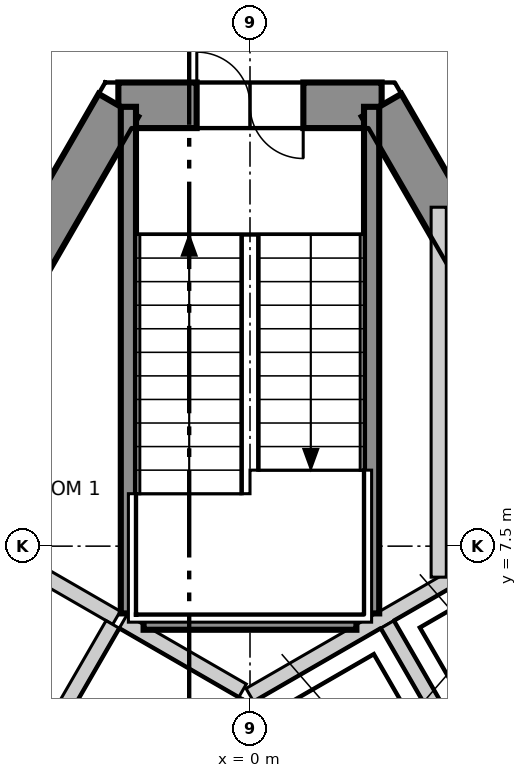
"""IFC4 building model, lengths in metres.
Left out: names, types, materials, properties, quantities, classifications, styles, units other than length and angle.
Written with IfcOpenShell. Run it as: python <this file> out.ifc"""

import sys

from ifc_helpers import new_model, si_unit, direction, frame, frame_2d, origin, place, context, subcontext, project, spatial, polyline, rectangle, outline, extrude, element, fill, save


model = new_model("IFC4")
c1 = context("Model", 3, precision=1e-05, world=origin(), true_north=direction((0.0, 1.0)))
c2 = subcontext(c1, "Body", "Model", "MODEL_VIEW")
j1 = project(units=[si_unit("LENGTHUNIT", "METRE"), si_unit("PLANEANGLEUNIT", "RADIAN")], contexts=[c1])
p1 = place(None, origin())
s1 = spatial("IfcSite", under=j1, at=p1, CompositionType="ELEMENT")
p2 = place(p1, origin())
s2 = spatial("IfcBuilding", under=s1, at=p2, CompositionType="ELEMENT")
p3 = place(p2, frame((0.0, 0.0, 268.3)))
s3 = spatial("IfcBuildingStorey", under=s2, at=p3, CompositionType="ELEMENT", Elevation=268.3)
p4 = place(p3, frame((1.732, 13.3, -0.3), z_axis=(0.0, 0.0, 1.0), x_axis=(-1.0, 0.0, 0.0)))
e1 = element("IfcWall", 1, at=p4, inside=s3, PredefinedType="SHEAR", context=c2, shape_type="SweptSolid", body=[
    extrude(outline(polyline([(-0.173, -0.3), (1.732, -0.3), (3.637, -0.3), (3.291, 0.3), (1.732, 0.3), (0.173, 0.3), (-0.173, -0.3)])), origin(), (0.0, 0.0, 1.0), 3.6),
])
p5 = place(p4, frame((1.032, 0.0, 0.3)))
e2 = element("IfcOpeningElement", 2, at=p5, cuts=e1, PredefinedType="OPENING", context=c2, shape_type="SweptSolid", body=[
    extrude(rectangle(XDim=1.4, YDim=2.1, at=frame_2d((0.7, 1.05))), frame((0.0, 0.31, 0.0), z_axis=(0.0, -1.0, 0.0), x_axis=(1.0, 0.0, 0.0)), (0.0, 0.0, 1.0), 0.62),
])
p6 = place(p3, frame((-1.732, 13.3, -0.3), z_axis=(0.0, 0.0, 1.0), x_axis=(-0.500000539815, -0.866025092122, 0.0)))
e3 = element("IfcWall", 3, at=p6, inside=s3, PredefinedType="SHEAR", context=c2, shape_type="SweptSolid", body=[
    extrude(outline(polyline([(-0.173, -0.3), (1.795, -0.3), (3.763, -0.3), (5.732, -0.3), (7.7, -0.3), (9.668, -0.301), (11.637, -0.301), (13.605, -0.301), (15.573, -0.301), (17.542, -0.301), (19.51, -0.301), (21.478, -0.301), (21.131, 0.3), (19.226, 0.3), (17.321, 0.3), (15.415, 0.3), (13.51, 0.3), (11.605, 0.3), (9.699, 0.3), (7.794, 0.3), (5.889, 0.3), (3.984, 0.3), (2.078, 0.3), (0.173, 0.3), (-0.173, -0.3)])), origin(), (0.0, 0.0, 1.0), 3.6),
])
p7 = place(p6, frame((10.102, 0.0, 0.3)))
e4 = element("IfcOpeningElement", 4, at=p7, cuts=e3, PredefinedType="OPENING", context=c2, shape_type="SweptSolid", body=[
    extrude(rectangle(XDim=1.1, YDim=2.1, at=frame_2d((0.55, 1.05))), frame((0.0, 0.31, 0.0), z_axis=(0.0, -1.0, 0.0), x_axis=(1.0, 0.0, 0.0)), (0.0, 0.0, 1.0), 0.621),
])
p8 = place(p6, frame((16.378, 0.0, 0.3)))
e5 = element("IfcOpeningElement", 5, at=p8, cuts=e3, PredefinedType="OPENING", context=c2, shape_type="SweptSolid", body=[
    extrude(rectangle(XDim=0.9, YDim=2.1, at=frame_2d((0.45, 1.05))), frame((0.0, 0.31, 0.0), z_axis=(0.0, -1.0, 0.0), x_axis=(1.0, 0.0, 0.0)), (0.0, 0.0, 1.0), 0.621),
])
p9 = place(p6, frame((4.026, 0.0, 0.3)))
e6 = element("IfcOpeningElement", 6, at=p9, cuts=e3, PredefinedType="OPENING", context=c2, shape_type="SweptSolid", body=[
    extrude(rectangle(XDim=0.9, YDim=2.1, at=frame_2d((0.45, 1.05))), frame((0.0, 0.31, 0.0), z_axis=(0.0, -1.0, 0.0), x_axis=(1.0, 0.0, 0.0)), (0.0, 0.0, 1.0), 0.621),
])
p10 = place(p3, frame((12.384, -5.15, -0.3), z_axis=(0.0, 0.0, 1.0), x_axis=(-0.500000539815, 0.866025092122, 0.0)))
e7 = element("IfcWall", 7, at=p10, inside=s3, PredefinedType="SHEAR", context=c2, shape_type="SweptSolid", body=[
    extrude(outline(polyline([(-0.173, -0.301), (1.795, -0.301), (3.763, -0.301), (5.731, -0.301), (7.7, -0.301), (9.668, -0.301), (11.636, -0.301), (13.604, -0.3), (15.573, -0.3), (17.541, -0.3), (19.509, -0.3), (21.477, -0.3), (21.131, 0.3), (19.226, 0.3), (17.321, 0.3), (15.415, 0.3), (13.51, 0.3), (11.605, 0.3), (9.699, 0.3), (7.794, 0.3), (5.889, 0.3), (3.984, 0.3), (2.078, 0.3), (0.173, 0.3), (-0.173, -0.301)])), origin(), (0.0, 0.0, 1.0), 3.6),
])
p11 = place(p10, frame((15.627, 0.0, 0.3)))
e8 = element("IfcOpeningElement", 8, at=p11, cuts=e7, PredefinedType="OPENING", context=c2, shape_type="SweptSolid", body=[
    extrude(rectangle(XDim=0.9, YDim=2.1, at=frame_2d((0.45, 1.05))), frame((0.0, 0.31, 0.0), z_axis=(0.0, -1.0, 0.0), x_axis=(1.0, 0.0, 0.0)), (0.0, 0.0, 1.0), 0.621),
])
p12 = place(p10, frame((4.026, 0.0, 0.3)))
e9 = element("IfcOpeningElement", 9, at=p12, cuts=e7, PredefinedType="OPENING", context=c2, shape_type="SweptSolid", body=[
    extrude(rectangle(XDim=0.9, YDim=2.1, at=frame_2d((0.45, 1.05))), frame((0.0, 0.31, 0.0), z_axis=(0.0, -1.0, 0.0), x_axis=(1.0, 0.0, 0.0)), (0.0, 0.0, 1.0), 0.621),
])
p13 = place(p3, frame((-2.577, 28.771, 0.0), z_axis=(0.0, 0.0, 1.0), x_axis=(-0.49999909388, -0.866025926932, 0.0)))
e10 = element("IfcWall", 10, at=p13, inside=s3, PredefinedType="ELEMENTEDWALL", context=c2, shape_type="SweptSolid", body=[
    extrude(rectangle(XDim=47.236, YDim=0.2, at=frame_2d((23.618, 0.0))), origin(), (0.0, 0.0, 1.0), 3.3),
])
p14 = place(p13, frame((2.243, 0.0, 0.9)))
e11 = element("IfcOpeningElement", 11, at=p14, cuts=e10, PredefinedType="OPENING", context=c2, shape_type="SweptSolid", body=[
    extrude(rectangle(XDim=3.7, YDim=2.2, at=frame_2d((1.85, 1.1))), frame((0.0, 0.11, 0.0), z_axis=(0.0, -1.0, 0.0), x_axis=(1.0, 0.0, 0.0)), (0.0, 0.0, 1.0), 0.22),
])
p15 = place(p13, frame((7.824, 0.0, 0.9)))
e12 = element("IfcOpeningElement", 12, at=p15, cuts=e10, PredefinedType="OPENING", context=c2, shape_type="SweptSolid", body=[
    extrude(rectangle(XDim=3.7, YDim=2.2, at=frame_2d((1.85, 1.1))), frame((0.0, 0.11, 0.0), z_axis=(0.0, -1.0, 0.0), x_axis=(1.0, 0.0, 0.0)), (0.0, 0.0, 1.0), 0.22),
])
p16 = place(p13, frame((13.406, 0.0, 0.9)))
e13 = element("IfcOpeningElement", 13, at=p16, cuts=e10, PredefinedType="OPENING", context=c2, shape_type="SweptSolid", body=[
    extrude(rectangle(XDim=3.7, YDim=2.2, at=frame_2d((1.85, 1.1))), frame((0.0, 0.11, 0.0), z_axis=(0.0, -1.0, 0.0), x_axis=(1.0, 0.0, 0.0)), (0.0, 0.0, 1.0), 0.22),
])
p17 = place(p13, frame((18.987, 0.0, 0.9)))
e14 = element("IfcOpeningElement", 14, at=p17, cuts=e10, PredefinedType="OPENING", context=c2, shape_type="SweptSolid", body=[
    extrude(rectangle(XDim=3.7, YDim=2.2, at=frame_2d((1.85, 1.1))), frame((0.0, 0.11, 0.0), z_axis=(0.0, -1.0, 0.0), x_axis=(1.0, 0.0, 0.0)), (0.0, 0.0, 1.0), 0.22),
])
p18 = place(p13, frame((24.569, 0.0, 0.9)))
e15 = element("IfcOpeningElement", 15, at=p18, cuts=e10, PredefinedType="OPENING", context=c2, shape_type="SweptSolid", body=[
    extrude(rectangle(XDim=3.7, YDim=2.2, at=frame_2d((1.85, 1.1))), frame((0.0, 0.11, 0.0), z_axis=(0.0, -1.0, 0.0), x_axis=(1.0, 0.0, 0.0)), (0.0, 0.0, 1.0), 0.22),
])
p19 = place(p13, frame((30.15, 0.0, 0.9)))
e16 = element("IfcOpeningElement", 16, at=p19, cuts=e10, PredefinedType="OPENING", context=c2, shape_type="SweptSolid", body=[
    extrude(rectangle(XDim=3.7, YDim=2.2, at=frame_2d((1.85, 1.1))), frame((0.0, 0.11, 0.0), z_axis=(0.0, -1.0, 0.0), x_axis=(1.0, 0.0, 0.0)), (0.0, 0.0, 1.0), 0.22),
])
p20 = place(p13, frame((35.731, 0.0, 0.9)))
e17 = element("IfcOpeningElement", 17, at=p20, cuts=e10, PredefinedType="OPENING", context=c2, shape_type="SweptSolid", body=[
    extrude(rectangle(XDim=3.7, YDim=2.2, at=frame_2d((1.85, 1.1))), frame((0.0, 0.11, 0.0), z_axis=(0.0, -1.0, 0.0), x_axis=(1.0, 0.0, 0.0)), (0.0, 0.0, 1.0), 0.22),
])
p21 = place(p13, frame((41.313, 0.0, 0.9)))
e18 = element("IfcOpeningElement", 18, at=p21, cuts=e10, PredefinedType="OPENING", context=c2, shape_type="SweptSolid", body=[
    extrude(rectangle(XDim=3.7, YDim=2.2, at=frame_2d((1.85, 1.1))), frame((0.0, 0.11, 0.0), z_axis=(0.0, -1.0, 0.0), x_axis=(1.0, 0.0, 0.0)), (0.0, 0.0, 1.0), 0.22),
])
p22 = place(p3, frame((26.205, -12.154, 0.0), z_axis=(0.0, 0.0, 1.0), x_axis=(-0.49999909388, 0.866025926932, 0.0)))
e19 = element("IfcWall", 19, at=p22, inside=s3, PredefinedType="ELEMENTEDWALL", context=c2, shape_type="SweptSolid", body=[
    extrude(rectangle(XDim=47.236, YDim=0.2, at=frame_2d((23.618, 0.0))), origin(), (0.0, 0.0, 1.0), 3.3),
])
p23 = place(p22, frame((2.243, 0.0, 0.9)))
e20 = element("IfcOpeningElement", 20, at=p23, cuts=e19, PredefinedType="OPENING", context=c2, shape_type="SweptSolid", body=[
    extrude(rectangle(XDim=3.7, YDim=2.2, at=frame_2d((1.85, 1.1))), frame((0.0, 0.11, 0.0), z_axis=(0.0, -1.0, 0.0), x_axis=(1.0, 0.0, 0.0)), (0.0, 0.0, 1.0), 0.22),
])
p24 = place(p22, frame((7.825, 0.0, 0.9)))
e21 = element("IfcOpeningElement", 21, at=p24, cuts=e19, PredefinedType="OPENING", context=c2, shape_type="SweptSolid", body=[
    extrude(rectangle(XDim=3.7, YDim=2.2, at=frame_2d((1.85, 1.1))), frame((0.0, 0.11, 0.0), z_axis=(0.0, -1.0, 0.0), x_axis=(1.0, 0.0, 0.0)), (0.0, 0.0, 1.0), 0.22),
])
p25 = place(p22, frame((13.406, 0.0, 0.9)))
e22 = element("IfcOpeningElement", 22, at=p25, cuts=e19, PredefinedType="OPENING", context=c2, shape_type="SweptSolid", body=[
    extrude(rectangle(XDim=3.7, YDim=2.2, at=frame_2d((1.85, 1.1))), frame((0.0, 0.11, 0.0), z_axis=(0.0, -1.0, 0.0), x_axis=(1.0, 0.0, 0.0)), (0.0, 0.0, 1.0), 0.22),
])
p26 = place(p22, frame((18.987, 0.0, 0.9)))
e23 = element("IfcOpeningElement", 23, at=p26, cuts=e19, PredefinedType="OPENING", context=c2, shape_type="SweptSolid", body=[
    extrude(rectangle(XDim=3.7, YDim=2.2, at=frame_2d((1.85, 1.1))), frame((0.0, 0.11, 0.0), z_axis=(0.0, -1.0, 0.0), x_axis=(1.0, 0.0, 0.0)), (0.0, 0.0, 1.0), 0.22),
])
p27 = place(p22, frame((24.569, 0.0, 0.9)))
e24 = element("IfcOpeningElement", 24, at=p27, cuts=e19, PredefinedType="OPENING", context=c2, shape_type="SweptSolid", body=[
    extrude(rectangle(XDim=3.7, YDim=2.2, at=frame_2d((1.85, 1.1))), frame((0.0, 0.11, 0.0), z_axis=(0.0, -1.0, 0.0), x_axis=(1.0, 0.0, 0.0)), (0.0, 0.0, 1.0), 0.22),
])
p28 = place(p22, frame((30.15, 0.0, 0.9)))
e25 = element("IfcOpeningElement", 25, at=p28, cuts=e19, PredefinedType="OPENING", context=c2, shape_type="SweptSolid", body=[
    extrude(rectangle(XDim=3.7, YDim=2.2, at=frame_2d((1.85, 1.1))), frame((0.0, 0.11, 0.0), z_axis=(0.0, -1.0, 0.0), x_axis=(1.0, 0.0, 0.0)), (0.0, 0.0, 1.0), 0.22),
])
p29 = place(p22, frame((35.732, 0.0, 0.9)))
e26 = element("IfcOpeningElement", 26, at=p29, cuts=e19, PredefinedType="OPENING", context=c2, shape_type="SweptSolid", body=[
    extrude(rectangle(XDim=3.7, YDim=2.2, at=frame_2d((1.85, 1.1))), frame((0.0, 0.11, 0.0), z_axis=(0.0, -1.0, 0.0), x_axis=(1.0, 0.0, 0.0)), (0.0, 0.0, 1.0), 0.22),
])
p30 = place(p22, frame((41.313, 0.0, 0.9)))
e27 = element("IfcOpeningElement", 27, at=p30, cuts=e19, PredefinedType="OPENING", context=c2, shape_type="SweptSolid", body=[
    extrude(rectangle(XDim=3.7, YDim=2.2, at=frame_2d((1.85, 1.1))), frame((0.0, 0.11, 0.0), z_axis=(0.0, -1.0, 0.0), x_axis=(1.0, 0.0, 0.0)), (0.0, 0.0, 1.0), 0.22),
])
p31 = place(p3, frame((-17.678, -10.12, 0.0), z_axis=(0.0, 0.0, 1.0), x_axis=(0.49998824015, 0.86603219323, 0.0)))
e28 = element("IfcWall", 28, at=p31, inside=s3, PredefinedType="PARTITIONING", context=c2, shape_type="SweptSolid", body=[
    extrude(rectangle(XDim=35.357, YDim=0.15, at=frame_2d((17.678, 0.0))), origin(), (0.0, 0.0, 1.0), 3.3),
])
p32 = place(p31, frame((31.607, 0.0, 0.0)))
e29 = element("IfcOpeningElement", 29, at=p32, cuts=e28, PredefinedType="OPENING", context=c2, shape_type="SweptSolid", body=[
    extrude(rectangle(XDim=1.0, YDim=2.1, at=frame_2d((0.5, 1.05))), frame((0.0, 0.085, 0.0), z_axis=(0.0, -1.0, 0.0), x_axis=(1.0, 0.0, 0.0)), (0.0, 0.0, 1.0), 0.17),
])
p33 = place(p31, frame((19.416, 0.0, 0.0)))
e30 = element("IfcOpeningElement", 30, at=p33, cuts=e28, PredefinedType="OPENING", context=c2, shape_type="SweptSolid", body=[
    extrude(rectangle(XDim=1.0, YDim=2.1, at=frame_2d((0.5, 1.05))), frame((0.0, 0.085, 0.0), z_axis=(0.0, -1.0, 0.0), x_axis=(1.0, 0.0, 0.0)), (0.0, 0.0, 1.0), 0.17),
])
p34 = place(p31, frame((24.916, 0.0, 0.0)))
e31 = element("IfcOpeningElement", 31, at=p34, cuts=e28, PredefinedType="OPENING", context=c2, shape_type="SweptSolid", body=[
    extrude(rectangle(XDim=0.9, YDim=2.1, at=frame_2d((0.45, 1.05))), frame((0.0, 0.085, 0.0), z_axis=(0.0, -1.0, 0.0), x_axis=(1.0, 0.0, 0.0)), (0.0, 0.0, 1.0), 0.17),
])
p35 = place(p31, frame((22.816, 0.0, 0.0)))
e32 = element("IfcOpeningElement", 32, at=p35, cuts=e28, PredefinedType="OPENING", context=c2, shape_type="SweptSolid", body=[
    extrude(rectangle(XDim=0.9, YDim=2.1, at=frame_2d((0.45, 1.05))), frame((0.0, 0.085, 0.0), z_axis=(0.0, -1.0, 0.0), x_axis=(1.0, 0.0, 0.0)), (0.0, 0.0, 1.0), 0.17),
])
p36 = place(p31, frame((14.654, 0.0, 0.0)))
e33 = element("IfcOpeningElement", 33, at=p36, cuts=e28, PredefinedType="OPENING", context=c2, shape_type="SweptSolid", body=[
    extrude(rectangle(XDim=1.0, YDim=2.1, at=frame_2d((0.5, 1.05))), frame((0.0, 0.085, 0.0), z_axis=(0.0, -1.0, 0.0), x_axis=(1.0, 0.0, 0.0)), (0.0, 0.0, 1.0), 0.17),
])
p37 = place(p31, frame((7.672, 0.0, 0.0)))
e34 = element("IfcOpeningElement", 34, at=p37, cuts=e28, PredefinedType="OPENING", context=c2, shape_type="SweptSolid", body=[
    extrude(rectangle(XDim=1.0, YDim=2.1, at=frame_2d((0.5, 1.05))), frame((0.0, 0.085, 0.0), z_axis=(0.0, -1.0, 0.0), x_axis=(1.0, 0.0, 0.0)), (0.0, 0.0, 1.0), 0.17),
])
p38 = place(p31, frame((2.69, 0.0, 0.0)))
e35 = element("IfcOpeningElement", 35, at=p38, cuts=e28, PredefinedType="OPENING", context=c2, shape_type="SweptSolid", body=[
    extrude(rectangle(XDim=1.0, YDim=2.1, at=frame_2d((0.5, 1.05))), frame((0.0, 0.085, 0.0), z_axis=(0.0, -1.0, 0.0), x_axis=(1.0, 0.0, 0.0)), (0.0, 0.0, 1.0), 0.17),
])
p39 = place(p3, frame((0.075, 20.37, 0.0), z_axis=(0.0, 0.0, 1.0), x_axis=(0.499988971979, -0.866031770721, 0.0)))
e36 = element("IfcWall", 36, at=p39, inside=s3, PredefinedType="PARTITIONING", context=c2, shape_type="SweptSolid", body=[
    extrude(rectangle(XDim=35.207, YDim=0.15, at=frame_2d((17.604, 0.0))), origin(), (0.0, 0.0, 1.0), 3.3),
])
p40 = place(p39, frame((31.606, 0.0, 0.0)))
e37 = element("IfcOpeningElement", 37, at=p40, cuts=e36, PredefinedType="OPENING", context=c2, shape_type="SweptSolid", body=[
    extrude(rectangle(XDim=1.0, YDim=2.1, at=frame_2d((0.5, 1.05))), frame((0.0, 0.085, 0.0), z_axis=(0.0, -1.0, 0.0), x_axis=(1.0, 0.0, 0.0)), (0.0, 0.0, 1.0), 0.17),
])
p41 = place(p39, frame((24.316, 0.0, 0.0)))
e38 = element("IfcOpeningElement", 38, at=p41, cuts=e36, PredefinedType="OPENING", context=c2, shape_type="SweptSolid", body=[
    extrude(rectangle(XDim=1.0, YDim=2.1, at=frame_2d((0.5, 1.05))), frame((0.0, 0.085, 0.0), z_axis=(0.0, -1.0, 0.0), x_axis=(1.0, 0.0, 0.0)), (0.0, 0.0, 1.0), 0.17),
])
p42 = place(p39, frame((18.735, 0.0, 0.0)))
e39 = element("IfcOpeningElement", 39, at=p42, cuts=e36, PredefinedType="OPENING", context=c2, shape_type="SweptSolid", body=[
    extrude(rectangle(XDim=1.0, YDim=2.1, at=frame_2d((0.5, 1.05))), frame((0.0, 0.085, 0.0), z_axis=(0.0, -1.0, 0.0), x_axis=(1.0, 0.0, 0.0)), (0.0, 0.0, 1.0), 0.17),
])
p43 = place(p39, frame((8.154, 0.0, 0.0)))
e40 = element("IfcOpeningElement", 40, at=p43, cuts=e36, PredefinedType="OPENING", context=c2, shape_type="SweptSolid", body=[
    extrude(rectangle(XDim=1.0, YDim=2.1, at=frame_2d((0.5, 1.05))), frame((0.0, 0.085, 0.0), z_axis=(0.0, -1.0, 0.0), x_axis=(1.0, 0.0, 0.0)), (0.0, 0.0, 1.0), 0.17),
])
p44 = place(p39, frame((13.754, 0.0, 0.0)))
e41 = element("IfcOpeningElement", 41, at=p44, cuts=e36, PredefinedType="OPENING", context=c2, shape_type="SweptSolid", body=[
    extrude(rectangle(XDim=0.9, YDim=2.1, at=frame_2d((0.45, 1.05))), frame((0.0, 0.085, 0.0), z_axis=(0.0, -1.0, 0.0), x_axis=(1.0, 0.0, 0.0)), (0.0, 0.0, 1.0), 0.17),
])
p45 = place(p39, frame((11.554, 0.0, 0.0)))
e42 = element("IfcOpeningElement", 42, at=p45, cuts=e36, PredefinedType="OPENING", context=c2, shape_type="SweptSolid", body=[
    extrude(rectangle(XDim=0.9, YDim=2.1, at=frame_2d((0.45, 1.05))), frame((0.0, 0.085, 0.0), z_axis=(0.0, -1.0, 0.0), x_axis=(1.0, 0.0, 0.0)), (0.0, 0.0, 1.0), 0.17),
])
p46 = place(p39, frame((2.69, 0.0, 0.0)))
e43 = element("IfcOpeningElement", 43, at=p46, cuts=e36, PredefinedType="OPENING", context=c2, shape_type="SweptSolid", body=[
    extrude(rectangle(XDim=1.0, YDim=2.1, at=frame_2d((0.5, 1.05))), frame((0.0, 0.085, 0.0), z_axis=(0.0, -1.0, 0.0), x_axis=(1.0, 0.0, 0.0)), (0.0, 0.0, 1.0), 0.17),
])
p47 = place(p3, frame((-0.002, 5.541, 0.0), z_axis=(0.0, 0.0, 1.0), x_axis=(0.86600155993, 0.500041296494, 0.0)))
e44 = element("IfcWall", 44, at=p47, inside=s3, PredefinedType="SOLIDWALL", context=c2, shape_type="SweptSolid", body=[
    extrude(rectangle(XDim=4.132, YDim=0.2, at=frame_2d((2.066, 0.0))), origin(), (0.0, 0.0, 1.0), 3.3),
])
p48 = place(p3, frame((1.578, 2.874, 0.0), z_axis=(0.0, 0.0, 1.0), x_axis=(0.866045911672, 0.499964477614, 0.0)))
e45 = element("IfcWall", 45, at=p48, inside=s3, PredefinedType="SOLIDWALL", context=c2, shape_type="SweptSolid", body=[
    extrude(rectangle(XDim=5.327, YDim=0.2, at=frame_2d((2.663, 0.0))), origin(), (0.0, 0.0, 1.0), 3.3),
])
p49 = place(p48, frame((2.496, 0.0, 0.0)))
e46 = element("IfcOpeningElement", 46, at=p49, cuts=e45, PredefinedType="OPENING", context=c2, shape_type="SweptSolid", body=[
    extrude(rectangle(XDim=1.1, YDim=2.1, at=frame_2d((0.55, 1.05))), frame((0.0, 0.11, 0.0), z_axis=(0.0, -1.0, 0.0), x_axis=(1.0, 0.0, 0.0)), (0.0, 0.0, 1.0), 0.22),
])
p50 = place(p3, frame((1.807, 6.47, 0.0), z_axis=(0.0, 0.0, 1.0), x_axis=(0.50012328804, -0.865954211699, 0.0)))
e47 = element("IfcWall", 47, at=p50, inside=s3, PredefinedType="SOLIDWALL", context=c2, shape_type="SweptSolid", body=[
    extrude(rectangle(XDim=2.9, YDim=0.2, at=frame_2d((1.45, 0.0))), origin(), (0.0, 0.0, 1.0), 3.3),
])
p51 = place(p3, frame((-3.489, 7.557, 0.0), z_axis=(0.0, 0.0, 1.0), x_axis=(0.866010750942, -0.50002537861, 0.0)))
e48 = element("IfcWall", 48, at=p51, inside=s3, PredefinedType="SOLIDWALL", context=c2, shape_type="SweptSolid", body=[
    extrude(rectangle(XDim=2.0, YDim=0.2, at=frame_2d((1.0, 0.0))), origin(), (0.0, 0.0, 1.0), 3.3),
])
p52 = place(p3, frame((-3.257, 3.959, 0.0), z_axis=(0.0, 0.0, 1.0), x_axis=(0.50012328804, 0.865954211699, 0.0)))
e49 = element("IfcWall", 49, at=p52, inside=s3, PredefinedType="SOLIDWALL", context=c2, shape_type="SweptSolid", body=[
    extrude(rectangle(XDim=2.9, YDim=0.2, at=frame_2d((1.45, 0.0))), origin(), (0.0, 0.0, 1.0), 3.3),
])
p53 = place(p3, frame((-1.67, 6.507, 0.0), z_axis=(0.0, 0.0, 1.0), x_axis=(0.865941441609, -0.500145398563, 0.0)))
e50 = element("IfcWall", 50, at=p53, inside=s3, PredefinedType="SOLIDWALL", context=c2, shape_type="SweptSolid", body=[
    extrude(rectangle(XDim=1.815, YDim=0.2, at=frame_2d((0.908, 0.0))), origin(), (0.0, 0.0, 1.0), 3.3),
])
p54 = place(p3, frame((2.483, 7.092, 0.0), z_axis=(0.0, 0.0, 1.0), x_axis=(0.0, 1.0, 0.0)))
e51 = element("IfcWall", 51, at=p54, inside=s3, PredefinedType="SOLIDWALL", context=c2, shape_type="SweptSolid", body=[
    extrude(rectangle(XDim=4.867, YDim=0.2, at=frame_2d((2.434, 0.0))), origin(), (0.0, 0.0, 1.0), 3.3),
])
p55 = place(p3, frame((1.6, 6.615, 0.0), z_axis=(0.0, 0.0, 1.0), x_axis=(0.0, 1.0, 0.0)))
e52 = element("IfcWall", 52, at=p55, inside=s3, PredefinedType="SOLIDWALL", context=c2, shape_type="SweptSolid", body=[
    extrude(rectangle(XDim=6.665, YDim=0.2, at=frame_2d((3.333, 0.0))), origin(), (0.0, 0.0, 1.0), 3.3),
])
p56 = place(p3, frame((-1.4, 6.5, 0.0), z_axis=(0.0, 0.0, 1.0), x_axis=(1.0, 0.0, 0.0)))
e53 = element("IfcWall", 53, at=p56, inside=s3, PredefinedType="SOLIDWALL", context=c2, shape_type="SweptSolid", body=[
    extrude(rectangle(XDim=2.8, YDim=0.2, at=frame_2d((1.4, 0.0))), origin(), (0.0, 0.0, 1.0), 3.3),
])
p57 = place(p3, frame((-1.6, 6.615, 0.0), z_axis=(0.0, 0.0, 1.0), x_axis=(0.0, 1.0, 0.0)))
e54 = element("IfcWall", 54, at=p57, inside=s3, PredefinedType="SOLIDWALL", context=c2, shape_type="SweptSolid", body=[
    extrude(rectangle(XDim=6.665, YDim=0.2, at=frame_2d((3.333, 0.0))), origin(), (0.0, 0.0, 1.0), 3.3),
])
p58 = place(p5, origin())
e55 = element("IfcDoor", 55, at=p58, inside=s3, OperationType="DOUBLE_DOOR_SINGLE_SWING", PredefinedType="DOOR", context=c2, shape_type="SweptSolid", body=[
    extrude(rectangle(XDim=1.4, YDim=2.1, at=frame_2d((0.7, 1.05))), frame((0.0, 0.025, 0.0), z_axis=(0.0, -1.0, 0.0), x_axis=(1.0, 0.0, 0.0)), (0.0, 0.0, 1.0), 0.05),
])
fill(e2, e55)
save(model, sys.argv[1])
